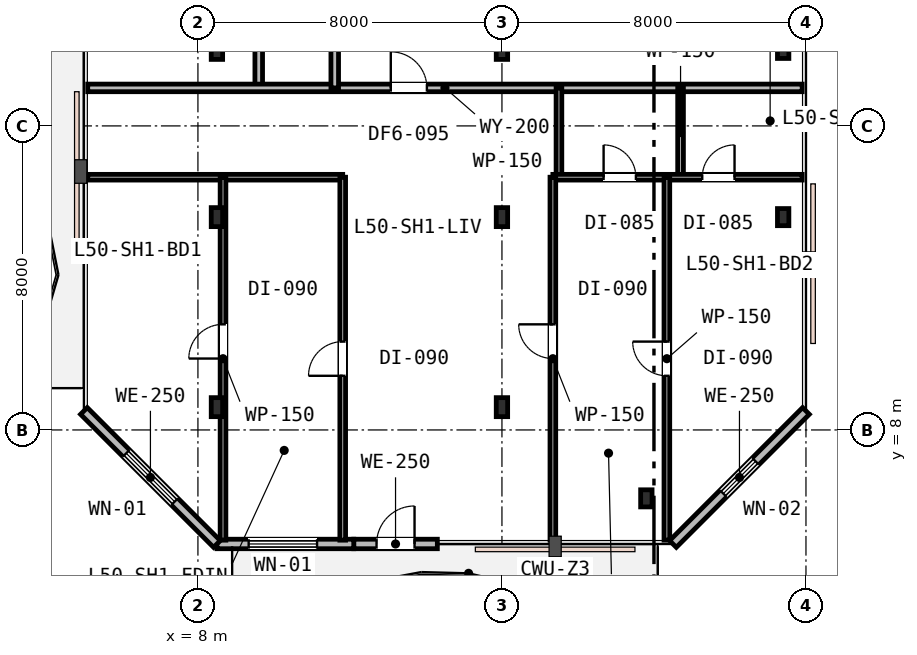
"""IFC4 building model, lengths in metres.
Left out: names, types, materials, properties, quantities, classifications, styles, units other than length and angle.
Written with IfcOpenShell. Run it as: python <this file> out.ifc"""

import sys

from ifc_helpers import new_model, si_unit, direction, frame, frame_2d, origin, origin_2d, place, context, subcontext, project, spatial, rectangle, i_section, extrude, element, fill, save


model = new_model("IFC4")
c1 = context("Model", 3, precision=1e-05, world=origin(), true_north=direction((0.0, 1.0)))
c2 = subcontext(c1, "Body", "Model", "MODEL_VIEW")
j1 = project(units=[si_unit("LENGTHUNIT", "METRE"), si_unit("PLANEANGLEUNIT", "RADIAN")], contexts=[c1])
p1 = place(None, origin())
s1 = spatial("IfcSite", under=j1, at=p1, CompositionType="ELEMENT")
p2 = place(p1, origin())
s2 = spatial("IfcBuilding", under=s1, at=p2, CompositionType="ELEMENT")
p3 = place(p2, frame((0.0, 0.0, 193.8)))
s3 = spatial("IfcBuildingStorey", under=s2, at=p3, CompositionType="ELEMENT", Elevation=193.8)
for number, where, z_axis, x_axis in (
    (1, (19.8, 6.2, 0.0), (0.0, 0.0, 1.0), (1.0, 0.0, 0.0)),
    (2, (23.4, 13.6, 0.0), (0.0, 0.0, 1.0), (1.0, 0.0, 0.0)),
    (3, (23.4, 18.0, 0.0), (0.0, 0.0, 1.0), (1.0, 0.0, 0.0)),
):
    element("IfcColumn", number, at=place(p3, frame(where, z_axis=z_axis, x_axis=x_axis)), inside=s3, PredefinedType="COLUMN", context=c2, shape_type="SweptSolid", body=[
        extrude(i_section(OverallWidth=0.3, OverallDepth=0.45, WebThickness=0.014, FlangeThickness=0.026, FilletRadius=0.027, at=origin_2d()), origin(), (0.0, 0.0, 1.0), 3.6),
    ])
for number, where, z_axis, x_axis in (
    (4, (8.5, 8.6, 0.0), (0.0, 0.0, 1.0), (1.0, 0.0, 0.0)),
    (5, (16.0, 8.6, 0.0), (0.0, 0.0, 1.0), (1.0, 0.0, 0.0)),
    (6, (8.5, 13.6, 0.0), (0.0, 0.0, 1.0), (1.0, 0.0, 0.0)),
    (7, (16.0, 13.6, 0.0), (0.0, 0.0, 1.0), (1.0, 0.0, 0.0)),
    (8, (8.5, 18.0, 0.0), (0.0, 0.0, 1.0), (1.0, 0.0, 0.0)),
    (9, (16.0, 18.0, 0.0), (0.0, 0.0, 1.0), (1.0, 0.0, 0.0)),
):
    element("IfcColumn", number, at=place(p3, frame(where, z_axis=z_axis, x_axis=x_axis)), inside=s3, PredefinedType="COLUMN", context=c2, shape_type="SweptSolid", body=[
        extrude(i_section(OverallWidth=0.3, OverallDepth=0.5, WebThickness=0.015, FlangeThickness=0.028, FilletRadius=0.027, at=origin_2d()), origin(), (0.0, 0.0, 1.0), 3.6),
    ])
p4 = place(p3, frame((12.1, 5.0, 0.0), z_axis=(0.0, 0.0, 1.0), x_axis=(1.0, 0.0, 0.0)))
e10 = element("IfcWall", 10, at=p4, inside=s3, PredefinedType="STANDARD", context=c2, shape_type="SweptSolid", body=[
    extrude(rectangle(XDim=2.2, YDim=0.25, at=frame_2d((1.1, 0.0))), origin(), (0.0, 0.0, 1.0), 3.33),
])
p5 = place(p4, frame((0.6, 0.0, 0.0)))
e11 = element("IfcOpeningElement", 11, at=p5, cuts=e10, PredefinedType="OPENING", context=c2, shape_type="SweptSolid", body=[
    extrude(rectangle(XDim=1.0, YDim=2.15, at=frame_2d((0.5, 1.075))), frame((0.0, 0.135, 0.0), z_axis=(0.0, -1.0, 0.0), x_axis=(1.0, 0.0, 0.0)), (0.0, 0.0, 1.0), 0.27),
])
p6 = place(p3, frame((8.5, 5.0, 0.0), z_axis=(0.0, 0.0, 1.0), x_axis=(1.0, 0.0, 0.0)))
e12 = element("IfcWall", 12, at=p6, inside=s3, PredefinedType="STANDARD", context=c2, shape_type="SweptSolid", body=[
    extrude(rectangle(XDim=3.6, YDim=0.25, at=frame_2d((1.8, 0.0))), origin(), (0.0, 0.0, 1.0), 3.33),
])
p7 = place(p6, frame((0.835, 0.0, 0.75)))
e13 = element("IfcOpeningElement", 13, at=p7, cuts=e12, PredefinedType="OPENING", context=c2, shape_type="SweptSolid", body=[
    extrude(rectangle(XDim=1.8, YDim=1.85, at=frame_2d((0.9, 0.925))), frame((0.0, 0.135, 0.0), z_axis=(0.0, -1.0, 0.0), x_axis=(1.0, 0.0, 0.0)), (0.0, 0.0, 1.0), 0.27),
])
p8 = place(p3, frame((20.5, 5.0, 0.0), z_axis=(0.0, 0.0, 1.0), x_axis=(0.707106781187, 0.707106781187, 0.0)))
e14 = element("IfcWall", 14, at=p8, inside=s3, PredefinedType="STANDARD", context=c2, shape_type="SweptSolid", body=[
    extrude(rectangle(XDim=4.95, YDim=0.25, at=frame_2d((2.475, 0.0))), origin(), (0.0, 0.0, 1.0), 3.33),
])
p9 = place(p8, frame((1.875, 0.0, 0.85)))
e15 = element("IfcOpeningElement", 15, at=p9, cuts=e14, PredefinedType="OPENING", context=c2, shape_type="SweptSolid", body=[
    extrude(rectangle(XDim=1.2, YDim=1.6, at=frame_2d((0.6, 0.8))), frame((0.0, 0.135, 0.0), z_axis=(0.0, -1.0, 0.0), x_axis=(1.0, 0.0, 0.0)), (0.0, 0.0, 1.0), 0.27),
])
p10 = place(p3, frame((5.0, 8.5, 0.0), z_axis=(0.0, 0.0, 1.0), x_axis=(0.707106781187, -0.707106781187, 0.0)))
e16 = element("IfcWall", 16, at=p10, inside=s3, PredefinedType="STANDARD", context=c2, shape_type="SweptSolid", body=[
    extrude(rectangle(XDim=4.95, YDim=0.25, at=frame_2d((2.475, 0.0))), origin(), (0.0, 0.0, 1.0), 3.33),
])
p11 = place(p10, frame((1.575, 0.0, 0.75)))
e17 = element("IfcOpeningElement", 17, at=p11, cuts=e16, PredefinedType="OPENING", context=c2, shape_type="SweptSolid", body=[
    extrude(rectangle(XDim=1.8, YDim=1.85, at=frame_2d((0.9, 0.925))), frame((0.0, 0.135, 0.0), z_axis=(0.0, -1.0, 0.0), x_axis=(1.0, 0.0, 0.0)), (0.0, 0.0, 1.0), 0.27),
])
p12 = place(p3, frame((9.6, 17.0, 0.0), z_axis=(0.0, 0.0, 1.0), x_axis=(0.0, 1.0, 0.0)))
e18 = element("IfcWall", 18, at=p12, inside=s3, PredefinedType="PARTITIONING", context=c2, shape_type="SweptSolid", body=[
    extrude(rectangle(XDim=25.9, YDim=0.2, at=frame_2d((12.95, 0.0))), origin(), (0.0, 0.0, 1.0), 2.92),
])
p13 = place(p12, frame((12.045, 0.0, 0.0)))
e19 = element("IfcOpeningElement", 19, at=p13, cuts=e18, PredefinedType="OPENING", context=c2, shape_type="SweptSolid", body=[
    extrude(rectangle(XDim=0.95, YDim=2.15, at=frame_2d((0.475, 1.075))), frame((0.0, 0.11, 0.0), z_axis=(0.0, -1.0, 0.0), x_axis=(1.0, 0.0, 0.0)), (0.0, 0.0, 1.0), 0.22),
])
p14 = place(p12, frame((3.125, 0.0, 0.0)))
e20 = element("IfcOpeningElement", 20, at=p14, cuts=e18, PredefinedType="OPENING", context=c2, shape_type="SweptSolid", body=[
    extrude(rectangle(XDim=0.95, YDim=2.15, at=frame_2d((0.475, 1.075))), frame((0.0, 0.11, 0.0), z_axis=(0.0, -1.0, 0.0), x_axis=(1.0, 0.0, 0.0)), (0.0, 0.0, 1.0), 0.22),
])
p15 = place(p3, frame((5.1, 17.0, 0.0), z_axis=(0.0, 0.0, 1.0), x_axis=(1.0, 0.0, 0.0)))
e21 = element("IfcWall", 21, at=p15, inside=s3, PredefinedType="PARTITIONING", context=c2, shape_type="SweptSolid", body=[
    extrude(rectangle(XDim=18.8, YDim=0.2, at=frame_2d((9.4, 0.0))), origin(), (0.0, 0.0, 1.0), 2.92),
])
p16 = place(p15, frame((7.975, 0.0, 0.0)))
e22 = element("IfcOpeningElement", 22, at=p16, cuts=e21, PredefinedType="OPENING", context=c2, shape_type="SweptSolid", body=[
    extrude(rectangle(XDim=0.95, YDim=2.15, at=frame_2d((0.475, 1.075))), frame((0.0, 0.11, 0.0), z_axis=(0.0, -1.0, 0.0), x_axis=(1.0, 0.0, 0.0)), (0.0, 0.0, 1.0), 0.22),
])
p17 = place(p3, frame((11.6, 17.0, 0.0), z_axis=(0.0, 0.0, 1.0), x_axis=(0.0, 1.0, 0.0)))
e23 = element("IfcWall", 23, at=p17, inside=s3, PredefinedType="PARTITIONING", context=c2, shape_type="SweptSolid", body=[
    extrude(rectangle(XDim=11.6, YDim=0.2, at=frame_2d((5.8, 0.0))), origin(), (0.0, 0.0, 1.0), 2.92),
])
p18 = place(p17, frame((8.225, 0.0, 0.0)))
e24 = element("IfcOpeningElement", 24, at=p18, cuts=e23, PredefinedType="OPENING", context=c2, shape_type="SweptSolid", body=[
    extrude(rectangle(XDim=0.95, YDim=2.15, at=frame_2d((0.475, 1.075))), frame((0.0, 0.11, 0.0), z_axis=(0.0, -1.0, 0.0), x_axis=(1.0, 0.0, 0.0)), (0.0, 0.0, 1.0), 0.22),
])
p19 = place(p17, frame((2.425, 0.0, 0.0)))
e25 = element("IfcOpeningElement", 25, at=p19, cuts=e23, PredefinedType="OPENING", context=c2, shape_type="SweptSolid", body=[
    extrude(rectangle(XDim=0.95, YDim=2.15, at=frame_2d((0.475, 1.075))), frame((0.0, 0.11, 0.0), z_axis=(0.0, -1.0, 0.0), x_axis=(1.0, 0.0, 0.0)), (0.0, 0.0, 1.0), 0.22),
])
p20 = place(p3, frame((17.5, 14.65, 0.0), z_axis=(0.0, 0.0, 1.0), x_axis=(0.0, 1.0, 0.0)))
e26 = element("IfcWall", 26, at=p20, inside=s3, PredefinedType="PARTITIONING", context=c2, shape_type="SweptSolid", body=[
    extrude(rectangle(XDim=2.35, YDim=0.15, at=frame_2d((1.175, 0.0))), origin(), (0.0, 0.0, 1.0), 3.33),
])
p21 = place(p3, frame((20.7, 14.65, 0.0), z_axis=(0.0, 0.0, 1.0), x_axis=(0.0, 1.0, 0.0)))
e27 = element("IfcWall", 27, at=p21, inside=s3, PredefinedType="PARTITIONING", context=c2, shape_type="SweptSolid", body=[
    extrude(rectangle(XDim=2.35, YDim=0.15, at=frame_2d((1.175, 0.0))), origin(), (0.0, 0.0, 1.0), 3.07),
])
p22 = place(p3, frame((17.34, 14.65, 0.0), z_axis=(0.0, 0.0, 1.0), x_axis=(1.0, 0.0, 0.0)))
e28 = element("IfcWall", 28, at=p22, inside=s3, PredefinedType="PARTITIONING", context=c2, shape_type="SweptSolid", body=[
    extrude(rectangle(XDim=6.56, YDim=0.15, at=frame_2d((3.28, 0.0))), origin(), (0.0, 0.0, 1.0), 3.02),
])
p23 = place(p22, frame((1.335, 0.0, 0.0)))
e29 = element("IfcOpeningElement", 29, at=p23, cuts=e28, PredefinedType="OPENING", context=c2, shape_type="SweptSolid", body=[
    extrude(rectangle(XDim=0.85, YDim=2.15, at=frame_2d((0.425, 1.075))), frame((0.0, 0.085, 0.0), z_axis=(0.0, -1.0, 0.0), x_axis=(1.0, 0.0, 0.0)), (0.0, 0.0, 1.0), 0.17),
])
p24 = place(p22, frame((3.93, 0.0, 0.0)))
e30 = element("IfcOpeningElement", 30, at=p24, cuts=e28, PredefinedType="OPENING", context=c2, shape_type="SweptSolid", body=[
    extrude(rectangle(XDim=0.85, YDim=2.15, at=frame_2d((0.425, 1.075))), frame((0.0, 0.085, 0.0), z_axis=(0.0, -1.0, 0.0), x_axis=(1.0, 0.0, 0.0)), (0.0, 0.0, 1.0), 0.17),
])
p25 = place(p3, frame((5.1, 14.65, 0.0), z_axis=(0.0, 0.0, 1.0), x_axis=(1.0, 0.0, 0.0)))
e31 = element("IfcWall", 31, at=p25, inside=s3, PredefinedType="PARTITIONING", context=c2, shape_type="SweptSolid", body=[
    extrude(rectangle(XDim=6.71, YDim=0.15, at=frame_2d((3.355, 0.0))), origin(), (0.0, 0.0, 1.0), 2.92),
])
p26 = place(p3, frame((8.66, 5.1, 0.0), z_axis=(0.0, 0.0, 1.0), x_axis=(0.0, 1.0, 0.0)))
e32 = element("IfcWall", 32, at=p26, inside=s3, PredefinedType="PARTITIONING", context=c2, shape_type="SweptSolid", body=[
    extrude(rectangle(XDim=9.55, YDim=0.15, at=frame_2d((4.775, 0.0))), origin(), (0.0, 0.0, 1.0), 2.92),
])
p27 = place(p26, frame((4.779, 0.0, 0.0)))
e33 = element("IfcOpeningElement", 33, at=p27, cuts=e32, PredefinedType="OPENING", context=c2, shape_type="SweptSolid", body=[
    extrude(rectangle(XDim=0.9, YDim=2.15, at=frame_2d((0.45, 1.075))), frame((0.0, 0.085, 0.0), z_axis=(0.0, -1.0, 0.0), x_axis=(1.0, 0.0, 0.0)), (0.0, 0.0, 1.0), 0.17),
])
p28 = place(p3, frame((20.34, 5.1, 0.0), z_axis=(0.0, 0.0, 1.0), x_axis=(0.0, 1.0, 0.0)))
e34 = element("IfcWall", 34, at=p28, inside=s3, PredefinedType="PARTITIONING", context=c2, shape_type="SweptSolid", body=[
    extrude(rectangle(XDim=9.55, YDim=0.15, at=frame_2d((4.775, 0.0))), origin(), (0.0, 0.0, 1.0), 2.92),
])
p29 = place(p28, frame((4.325, 0.0, 0.0)))
e35 = element("IfcOpeningElement", 35, at=p29, cuts=e34, PredefinedType="OPENING", context=c2, shape_type="SweptSolid", body=[
    extrude(rectangle(XDim=0.9, YDim=2.15, at=frame_2d((0.45, 1.075))), frame((0.0, 0.085, 0.0), z_axis=(0.0, -1.0, 0.0), x_axis=(1.0, 0.0, 0.0)), (0.0, 0.0, 1.0), 0.17),
])
p30 = place(p3, frame((17.34, 5.1, 0.0), z_axis=(0.0, 0.0, 1.0), x_axis=(0.0, 1.0, 0.0)))
e36 = element("IfcWall", 36, at=p30, inside=s3, PredefinedType="PARTITIONING", context=c2, shape_type="SweptSolid", body=[
    extrude(rectangle(XDim=9.55, YDim=0.15, at=frame_2d((4.775, 0.0))), origin(), (0.0, 0.0, 1.0), 2.92),
])
p31 = place(p30, frame((4.779, 0.0, 0.0)))
e37 = element("IfcOpeningElement", 37, at=p31, cuts=e36, PredefinedType="OPENING", context=c2, shape_type="SweptSolid", body=[
    extrude(rectangle(XDim=0.9, YDim=2.15, at=frame_2d((0.45, 1.075))), frame((0.0, 0.085, 0.0), z_axis=(0.0, -1.0, 0.0), x_axis=(1.0, 0.0, 0.0)), (0.0, 0.0, 1.0), 0.17),
])
p32 = place(p3, frame((11.81, 5.1, 0.0), z_axis=(0.0, 0.0, 1.0), x_axis=(0.0, 1.0, 0.0)))
e38 = element("IfcWall", 38, at=p32, inside=s3, PredefinedType="PARTITIONING", context=c2, shape_type="SweptSolid", body=[
    extrude(rectangle(XDim=9.55, YDim=0.15, at=frame_2d((4.775, 0.0))), origin(), (0.0, 0.0, 1.0), 2.92),
])
p33 = place(p32, frame((4.325, 0.0, 0.0)))
e39 = element("IfcOpeningElement", 39, at=p33, cuts=e38, PredefinedType="OPENING", context=c2, shape_type="SweptSolid", body=[
    extrude(rectangle(XDim=0.9, YDim=2.15, at=frame_2d((0.45, 1.075))), frame((0.0, 0.085, 0.0), z_axis=(0.0, -1.0, 0.0), x_axis=(1.0, 0.0, 0.0)), (0.0, 0.0, 1.0), 0.17),
])
p34 = place(p5, origin())
e40 = element("IfcDoor", 40, at=p34, inside=s3, OperationType="SINGLE_SWING_RIGHT", PredefinedType="DOOR", context=c2, shape_type="SweptSolid", body=[
    extrude(rectangle(XDim=1.0, YDim=2.15, at=frame_2d((0.5, 1.075))), frame((0.0, 0.025, 0.0), z_axis=(0.0, -1.0, 0.0), x_axis=(1.0, 0.0, 0.0)), (0.0, 0.0, 1.0), 0.05),
])
fill(e11, e40)
p35 = place(p7, origin())
e41 = element("IfcWindow", 41, at=p35, inside=s3, PartitioningType="SINGLE_PANEL", PredefinedType="WINDOW", context=c2, shape_type="SweptSolid", body=[
    extrude(rectangle(XDim=1.8, YDim=1.85, at=frame_2d((0.9, 0.925))), frame((0.0, 0.03, 0.0), z_axis=(0.0, -1.0, 0.0), x_axis=(1.0, 0.0, 0.0)), (0.0, 0.0, 1.0), 0.06),
])
fill(e13, e41)
p36 = place(p9, origin())
e42 = element("IfcWindow", 42, at=p36, inside=s3, PartitioningType="SINGLE_PANEL", PredefinedType="WINDOW", context=c2, shape_type="SweptSolid", body=[
    extrude(rectangle(XDim=1.2, YDim=1.6, at=frame_2d((0.6, 0.8))), frame((0.0, 0.03, 0.0), z_axis=(0.0, -1.0, 0.0), x_axis=(1.0, 0.0, 0.0)), (0.0, 0.0, 1.0), 0.06),
])
fill(e15, e42)
p37 = place(p11, origin())
e43 = element("IfcWindow", 43, at=p37, inside=s3, PartitioningType="SINGLE_PANEL", PredefinedType="WINDOW", context=c2, shape_type="SweptSolid", body=[
    extrude(rectangle(XDim=1.8, YDim=1.85, at=frame_2d((0.9, 0.925))), frame((0.0, 0.03, 0.0), z_axis=(0.0, -1.0, 0.0), x_axis=(1.0, 0.0, 0.0)), (0.0, 0.0, 1.0), 0.06),
])
fill(e17, e43)
p38 = place(p16, origin())
e44 = element("IfcDoor", 44, at=p38, inside=s3, OperationType="SINGLE_SWING_LEFT", PredefinedType="DOOR", context=c2, shape_type="SweptSolid", body=[
    extrude(rectangle(XDim=0.95, YDim=2.15, at=frame_2d((0.475, 1.075))), frame((0.0, 0.025, 0.0), z_axis=(0.0, -1.0, 0.0), x_axis=(1.0, 0.0, 0.0)), (0.0, 0.0, 1.0), 0.05),
])
fill(e22, e44)
p39 = place(p23, origin())
e45 = element("IfcDoor", 45, at=p39, inside=s3, OperationType="SINGLE_SWING_LEFT", PredefinedType="DOOR", context=c2, shape_type="SweptSolid", body=[
    extrude(rectangle(XDim=0.85, YDim=2.15, at=frame_2d((0.425, 1.075))), frame((0.0, 0.025, 0.0), z_axis=(0.0, -1.0, 0.0), x_axis=(1.0, 0.0, 0.0)), (0.0, 0.0, 1.0), 0.05),
])
fill(e29, e45)
p40 = place(p24, origin())
e46 = element("IfcDoor", 46, at=p40, inside=s3, OperationType="SINGLE_SWING_RIGHT", PredefinedType="DOOR", context=c2, shape_type="SweptSolid", body=[
    extrude(rectangle(XDim=0.85, YDim=2.15, at=frame_2d((0.425, 1.075))), frame((0.0, 0.025, 0.0), z_axis=(0.0, -1.0, 0.0), x_axis=(1.0, 0.0, 0.0)), (0.0, 0.0, 1.0), 0.05),
])
fill(e30, e46)
p41 = place(p27, origin())
e47 = element("IfcDoor", 47, at=p41, inside=s3, OperationType="SINGLE_SWING_LEFT", PredefinedType="DOOR", context=c2, shape_type="SweptSolid", body=[
    extrude(rectangle(XDim=0.9, YDim=2.15, at=frame_2d((0.45, 1.075))), frame((0.0, 0.025, 0.0), z_axis=(0.0, -1.0, 0.0), x_axis=(1.0, 0.0, 0.0)), (0.0, 0.0, 1.0), 0.05),
])
fill(e33, e47)
p42 = place(p29, origin())
e48 = element("IfcDoor", 48, at=p42, inside=s3, OperationType="SINGLE_SWING_RIGHT", PredefinedType="DOOR", context=c2, shape_type="SweptSolid", body=[
    extrude(rectangle(XDim=0.9, YDim=2.15, at=frame_2d((0.45, 1.075))), frame((0.0, 0.025, 0.0), z_axis=(0.0, -1.0, 0.0), x_axis=(1.0, 0.0, 0.0)), (0.0, 0.0, 1.0), 0.05),
])
fill(e35, e48)
p43 = place(p31, origin())
e49 = element("IfcDoor", 49, at=p43, inside=s3, OperationType="SINGLE_SWING_RIGHT", PredefinedType="DOOR", context=c2, shape_type="SweptSolid", body=[
    extrude(rectangle(XDim=0.9, YDim=2.15, at=frame_2d((0.45, 1.075))), frame((0.0, 0.025, 0.0), z_axis=(0.0, -1.0, 0.0), x_axis=(1.0, 0.0, 0.0)), (0.0, 0.0, 1.0), 0.05),
])
fill(e37, e49)
p44 = place(p33, origin())
e50 = element("IfcDoor", 50, at=p44, inside=s3, OperationType="SINGLE_SWING_LEFT", PredefinedType="DOOR", context=c2, shape_type="SweptSolid", body=[
    extrude(rectangle(XDim=0.9, YDim=2.15, at=frame_2d((0.45, 1.075))), frame((0.0, 0.025, 0.0), z_axis=(0.0, -1.0, 0.0), x_axis=(1.0, 0.0, 0.0)), (0.0, 0.0, 1.0), 0.05),
])
fill(e39, e50)
save(model, sys.argv[1])
